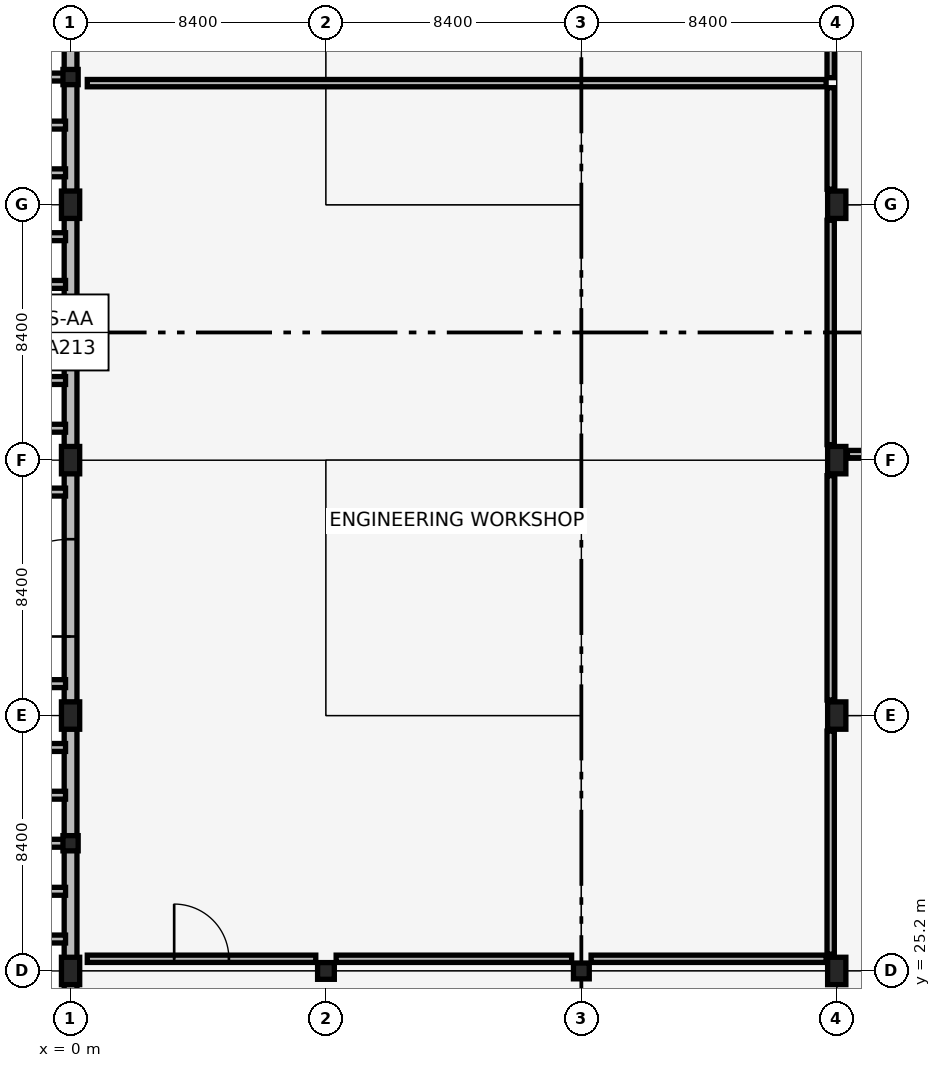
"""IFC4 building model, lengths in metres.
Left out: names, types, materials, properties, quantities, classifications, styles, units other than length and angle.
Written with IfcOpenShell. Run it as: python <this file> out.ifc"""

import sys

from ifc_helpers import new_model, si_unit, direction, frame, frame_2d, origin, origin_2d, place, context, subcontext, project, spatial, rectangle, extrude, element, fill, save


model = new_model("IFC4")
c1 = context("Model", 3, precision=1e-05, world=origin(), true_north=direction((0.0, 1.0)))
c2 = subcontext(c1, "Body", "Model", "MODEL_VIEW")
j1 = project(units=[si_unit("LENGTHUNIT", "METRE"), si_unit("PLANEANGLEUNIT", "RADIAN")], contexts=[c1])
p1 = place(None, origin())
s1 = spatial("IfcSite", under=j1, at=p1, CompositionType="ELEMENT")
p2 = place(p1, origin())
s2 = spatial("IfcBuilding", under=s1, at=p2, CompositionType="ELEMENT")
p3 = place(p2, origin())
s3 = spatial("IfcBuildingStorey", under=s2, at=p3, CompositionType="ELEMENT", Elevation=0.0)
p4 = place(p3, frame((0.0, 25.2, 0.0), z_axis=(0.0, 0.0, 1.0), x_axis=(1.0, 0.0, 0.0)))
e1 = element("IfcColumn", 1, at=p4, inside=s3, PredefinedType="COLUMN", context=c2, shape_type="SweptSolid", body=[
    extrude(rectangle(XDim=0.6, YDim=0.9, at=origin_2d()), origin(), (0.0, 0.0, 1.0), 5.14),
])
p5 = place(p3, frame((0.0, 29.4, 0.0), z_axis=(0.0, 0.0, 1.0), x_axis=(1.0, 0.0, 0.0)))
e2 = element("IfcColumn", 2, at=p5, inside=s3, PredefinedType="PILASTER", context=c2, shape_type="SweptSolid", body=[
    extrude(rectangle(XDim=0.5, YDim=0.5, at=origin_2d()), origin(), (0.0, 0.0, 1.0), 5.14),
])
for number, where, z_axis, x_axis in (
    (3, (0.0, 33.6, 0.0), (0.0, 0.0, 1.0), (1.0, 0.0, 0.0)),
    (4, (0.0, 42.0, 0.0), (0.0, 0.0, 1.0), (1.0, 0.0, 0.0)),
):
    element("IfcColumn", number, at=place(p3, frame(where, z_axis=z_axis, x_axis=x_axis)), inside=s3, PredefinedType="COLUMN", context=c2, shape_type="SweptSolid", body=[
        extrude(rectangle(XDim=0.6, YDim=0.9, at=origin_2d()), origin(), (0.0, 0.0, 1.0), 5.14),
    ])
p6 = place(p3, frame((0.0, 46.2, 0.0), z_axis=(0.0, 0.0, 1.0), x_axis=(1.0, 0.0, 0.0)))
e5 = element("IfcColumn", 5, at=p6, inside=s3, PredefinedType="PILASTER", context=c2, shape_type="SweptSolid", body=[
    extrude(rectangle(XDim=0.5, YDim=0.5, at=origin_2d()), origin(), (0.0, 0.0, 1.0), 5.14),
])
p7 = place(p3, frame((0.0, 50.4, 0.0), z_axis=(0.0, 0.0, 1.0), x_axis=(1.0, 0.0, 0.0)))
e6 = element("IfcColumn", 6, at=p7, inside=s3, PredefinedType="COLUMN", context=c2, shape_type="SweptSolid", body=[
    extrude(rectangle(XDim=0.6, YDim=0.9, at=origin_2d()), origin(), (0.0, 0.0, 1.0), 5.14),
])
p8 = place(p3, frame((0.0, 54.6, 0.0), z_axis=(0.0, 0.0, 1.0), x_axis=(1.0, 0.0, 0.0)))
e7 = element("IfcColumn", 7, at=p8, inside=s3, PredefinedType="PILASTER", context=c2, shape_type="SweptSolid", body=[
    extrude(rectangle(XDim=0.5, YDim=0.5, at=origin_2d()), origin(), (0.0, 0.0, 1.0), 5.14),
])
p9 = place(p3, frame((8.4, 25.2, 0.0), z_axis=(0.0, 0.0, 1.0), x_axis=(1.0, 0.0, 0.0)))
e8 = element("IfcColumn", 8, at=p9, inside=s3, PredefinedType="COLUMN", context=c2, shape_type="SweptSolid", body=[
    extrude(rectangle(XDim=0.55, YDim=0.55, at=origin_2d()), origin(), (0.0, 0.0, 1.0), 5.16),
])
p10 = place(p3, frame((16.8, 25.2, 0.0), z_axis=(0.0, 0.0, 1.0), x_axis=(1.0, 0.0, 0.0)))
e9 = element("IfcColumn", 9, at=p10, inside=s3, PredefinedType="COLUMN", context=c2, shape_type="SweptSolid", body=[
    extrude(rectangle(XDim=0.52, YDim=0.52, at=origin_2d()), origin(), (0.0, 0.0, 1.0), 5.16),
])
for number, where, z_axis, x_axis in (
    (10, (25.2, 25.2, 0.0), (0.0, 0.0, 1.0), (1.0, 0.0, 0.0)),
    (11, (25.2, 33.6, 0.0), (0.0, 0.0, 1.0), (1.0, 0.0, 0.0)),
    (12, (25.2, 42.0, 0.0), (0.0, 0.0, 1.0), (1.0, 0.0, 0.0)),
    (13, (25.2, 50.4, 0.0), (0.0, 0.0, 1.0), (1.0, 0.0, 0.0)),
):
    element("IfcColumn", number, at=place(p3, frame(where, z_axis=z_axis, x_axis=x_axis)), inside=s3, PredefinedType="COLUMN", context=c2, shape_type="SweptSolid", body=[
        extrude(rectangle(XDim=0.6, YDim=0.9, at=origin_2d()), origin(), (0.0, 0.0, 1.0), 5.14),
    ])
p11 = place(p3, frame((0.0, 17.025, 0.0), z_axis=(0.0, 0.0, 1.0), x_axis=(0.0, 1.0, 0.0)))
e14 = element("IfcWall", 14, at=p11, inside=s3, PredefinedType="SOLIDWALL", context=c2, shape_type="SweptSolid", body=[
    extrude(rectangle(XDim=7.74, YDim=0.42, at=frame_2d((3.87, 0.0))), origin(), (0.0, 0.0, 1.0), 4.39),
])
p12 = place(p3, frame((0.0, 25.635, 0.0), z_axis=(0.0, 0.0, 1.0), x_axis=(0.0, 1.0, 0.0)))
e15 = element("IfcWall", 15, at=p12, inside=s3, PredefinedType="SOLIDWALL", context=c2, shape_type="SweptSolid", body=[
    extrude(rectangle(XDim=7.53, YDim=0.42, at=frame_2d((3.765, 0.0))), origin(), (0.0, 0.0, 1.0), 5.04),
])
for number, where, z_axis, x_axis in (
    (16, (-0.165, 26.25, -0.25), (0.0, 0.0, 1.0), (-1.0, 0.0, 0.0)),
    (17, (-0.165, 27.82, -0.25), (0.0, 0.0, 1.0), (-1.0, 0.0, 0.0)),
    (18, (-0.165, 29.4, -0.25), (0.0, 0.0, 1.0), (-1.0, 0.0, 0.0)),
    (19, (-0.165, 30.98, -0.25), (0.0, 0.0, 1.0), (-1.0, 0.0, 0.0)),
    (20, (-0.165, 32.55, -0.25), (0.0, 0.0, 1.0), (-1.0, 0.0, 0.0)),
):
    element("IfcWall", number, at=place(p3, frame(where, z_axis=z_axis, x_axis=x_axis)), inside=s3, PredefinedType="SOLIDWALL", context=c2, shape_type="SweptSolid", body=[
        extrude(rectangle(XDim=0.7, YDim=0.26, at=frame_2d((0.35, 0.0))), origin(), (0.0, 0.0, 1.0), 5.69),
    ])
p13 = place(p3, frame((0.0, 34.035, 0.0), z_axis=(0.0, 0.0, 1.0), x_axis=(0.0, 1.0, 0.0)))
e21 = element("IfcWall", 21, at=p13, inside=s3, PredefinedType="SOLIDWALL", context=c2, shape_type="SweptSolid", body=[
    extrude(rectangle(XDim=7.53, YDim=0.42, at=frame_2d((3.765, 0.0))), origin(), (0.0, 0.0, 1.0), 5.04),
])
p14 = place(p13, frame((2.165, 0.0, 0.0)))
e22 = element("IfcOpeningElement", 22, at=p14, cuts=e21, PredefinedType="OPENING", context=c2, shape_type="SweptSolid", body=[
    extrude(rectangle(XDim=3.2, YDim=3.6, at=frame_2d((1.6, 1.8))), frame((0.0, 0.22, 0.0), z_axis=(0.0, -1.0, 0.0), x_axis=(1.0, 0.0, 0.0)), (0.0, 0.0, 1.0), 0.44),
])
for number, where, z_axis, x_axis in (
    (23, (-0.165, 34.65, -0.25), (0.0, 0.0, 1.0), (-1.0, 0.0, 0.0)),
    (24, (-0.165, 40.95, -0.25), (0.0, 0.0, 1.0), (-1.0, 0.0, 0.0)),
):
    element("IfcWall", number, at=place(p3, frame(where, z_axis=z_axis, x_axis=x_axis)), inside=s3, PredefinedType="SOLIDWALL", context=c2, shape_type="SweptSolid", body=[
        extrude(rectangle(XDim=0.7, YDim=0.26, at=frame_2d((0.35, 0.0))), origin(), (0.0, 0.0, 1.0), 5.69),
    ])
p15 = place(p3, frame((0.0, 42.435, 0.0), z_axis=(0.0, 0.0, 1.0), x_axis=(0.0, 1.0, 0.0)))
e25 = element("IfcWall", 25, at=p15, inside=s3, PredefinedType="SOLIDWALL", context=c2, shape_type="SweptSolid", body=[
    extrude(rectangle(XDim=7.53, YDim=0.42, at=frame_2d((3.765, 0.0))), origin(), (0.0, 0.0, 1.0), 5.04),
])
for number, where, z_axis, x_axis in (
    (26, (-0.165, 43.05, -0.25), (0.0, 0.0, 1.0), (-1.0, 0.0, 0.0)),
    (27, (-0.165, 44.62, -0.25), (0.0, 0.0, 1.0), (-1.0, 0.0, 0.0)),
    (28, (-0.165, 46.2, -0.25), (0.0, 0.0, 1.0), (-1.0, 0.0, 0.0)),
    (29, (-0.165, 47.78, -0.25), (0.0, 0.0, 1.0), (-1.0, 0.0, 0.0)),
    (30, (-0.165, 49.35, -0.25), (0.0, 0.0, 1.0), (-1.0, 0.0, 0.0)),
):
    element("IfcWall", number, at=place(p3, frame(where, z_axis=z_axis, x_axis=x_axis)), inside=s3, PredefinedType="SOLIDWALL", context=c2, shape_type="SweptSolid", body=[
        extrude(rectangle(XDim=0.7, YDim=0.26, at=frame_2d((0.35, 0.0))), origin(), (0.0, 0.0, 1.0), 5.69),
    ])
p16 = place(p3, frame((0.0, 50.835, 0.0), z_axis=(0.0, 0.0, 1.0), x_axis=(0.0, 1.0, 0.0)))
e31 = element("IfcWall", 31, at=p16, inside=s3, PredefinedType="SOLIDWALL", context=c2, shape_type="SweptSolid", body=[
    extrude(rectangle(XDim=7.53, YDim=0.42, at=frame_2d((3.765, 0.0))), origin(), (0.0, 0.0, 1.0), 5.04),
])
for number, where, z_axis, x_axis in (
    (32, (-0.165, 51.45, -0.25), (0.0, 0.0, 1.0), (-1.0, 0.0, 0.0)),
    (33, (-0.165, 53.02, -0.25), (0.0, 0.0, 1.0), (-1.0, 0.0, 0.0)),
    (34, (-0.165, 54.6, -0.25), (0.0, 0.0, 1.0), (-1.0, 0.0, 0.0)),
):
    element("IfcWall", number, at=place(p3, frame(where, z_axis=z_axis, x_axis=x_axis)), inside=s3, PredefinedType="SOLIDWALL", context=c2, shape_type="SweptSolid", body=[
        extrude(rectangle(XDim=0.7, YDim=0.26, at=frame_2d((0.35, 0.0))), origin(), (0.0, 0.0, 1.0), 5.69),
    ])
p17 = place(p3, frame((0.55, 25.6, 0.0), z_axis=(0.0, 0.0, 1.0), x_axis=(1.0, 0.0, 0.0)))
e35 = element("IfcWall", 35, at=p17, inside=s3, PredefinedType="PARTITIONING", context=c2, shape_type="SweptSolid", body=[
    extrude(rectangle(XDim=7.515, YDim=0.24, at=frame_2d((3.757, 0.0))), origin(), (0.0, 0.0, 1.0), 5.14),
])
p18 = place(p17, frame((2.857, 0.0, 0.0)))
e36 = element("IfcOpeningElement", 36, at=p18, cuts=e35, PredefinedType="OPENING", context=c2, shape_type="SweptSolid", body=[
    extrude(rectangle(XDim=1.8, YDim=2.4, at=frame_2d((0.9, 1.2))), frame((0.0, 0.13, 0.0), z_axis=(0.0, -1.0, 0.0), x_axis=(1.0, 0.0, 0.0)), (0.0, 0.0, 1.0), 0.26),
])
p19 = place(p3, frame((8.735, 25.6, 0.0), z_axis=(0.0, 0.0, 1.0), x_axis=(1.0, 0.0, 0.0)))
e37 = element("IfcWall", 37, at=p19, inside=s3, PredefinedType="PARTITIONING", context=c2, shape_type="SweptSolid", body=[
    extrude(rectangle(XDim=7.745, YDim=0.24, at=frame_2d((3.873, 0.0))), origin(), (0.0, 0.0, 1.0), 5.14),
])
p20 = place(p3, frame((17.12, 25.6, 0.0), z_axis=(0.0, 0.0, 1.0), x_axis=(1.0, 0.0, 0.0)))
e38 = element("IfcWall", 38, at=p20, inside=s3, PredefinedType="PARTITIONING", context=c2, shape_type="SweptSolid", body=[
    extrude(rectangle(XDim=7.73, YDim=0.24, at=frame_2d((3.865, 0.0))), origin(), (0.0, 0.0, 1.0), 5.14),
])
p21 = place(p3, frame((0.55, 54.4, 0.0), z_axis=(0.0, 0.0, 1.0), x_axis=(1.0, 0.0, 0.0)))
e39 = element("IfcWall", 39, at=p21, inside=s3, PredefinedType="PARTITIONING", context=c2, shape_type="SweptSolid", body=[
    extrude(rectangle(XDim=24.3, YDim=0.24, at=frame_2d((12.15, 0.0))), origin(), (0.0, 0.0, 1.0), 5.14),
])
p22 = place(p3, frame((25.0, 25.75, 0.0), z_axis=(0.0, 0.0, 1.0), x_axis=(0.0, 1.0, 0.0)))
e40 = element("IfcWall", 40, at=p22, inside=s3, PredefinedType="PARTITIONING", context=c2, shape_type="SweptSolid", body=[
    extrude(rectangle(XDim=7.34, YDim=0.24, at=frame_2d((3.67, 0.0))), origin(), (0.0, 0.0, 1.0), 4.35),
])
for number, where, z_axis, x_axis in (
    (41, (25.0, 34.11, 0.0), (0.0, 0.0, 1.0), (0.0, 1.0, 0.0)),
    (42, (25.0, 42.51, 0.0), (0.0, 0.0, 1.0), (0.0, 1.0, 0.0)),
):
    element("IfcWall", number, at=place(p3, frame(where, z_axis=z_axis, x_axis=x_axis)), inside=s3, PredefinedType="PARTITIONING", context=c2, shape_type="SweptSolid", body=[
        extrude(rectangle(XDim=7.38, YDim=0.24, at=frame_2d((3.69, 0.0))), origin(), (0.0, 0.0, 1.0), 4.35),
    ])
p23 = place(p3, frame((25.0, 50.91, 0.0), z_axis=(0.0, 0.0, 1.0), x_axis=(0.0, 1.0, 0.0)))
e43 = element("IfcWall", 43, at=p23, inside=s3, PredefinedType="PARTITIONING", context=c2, shape_type="SweptSolid", body=[
    extrude(rectangle(XDim=3.34, YDim=0.24, at=frame_2d((1.67, 0.0))), origin(), (0.0, 0.0, 1.0), 4.35),
])
p24 = place(p3, frame((25.0, 54.58, 0.0), z_axis=(0.0, 0.0, 1.0), x_axis=(0.0, 1.0, 0.0)))
e44 = element("IfcWall", 44, at=p24, inside=s3, PredefinedType="PARTITIONING", context=c2, shape_type="SweptSolid", body=[
    extrude(rectangle(XDim=3.71, YDim=0.24, at=frame_2d((1.855, 0.0))), origin(), (0.0, 0.0, 1.0), 4.35),
])
p25 = place(p24, frame((0.955, 0.0, 0.0)))
e45 = element("IfcOpeningElement", 45, at=p25, cuts=e44, PredefinedType="OPENING", context=c2, shape_type="SweptSolid", body=[
    extrude(rectangle(XDim=1.8, YDim=2.4, at=frame_2d((0.9, 1.2))), frame((0.0, 0.13, 0.0), z_axis=(0.0, -1.0, 0.0), x_axis=(1.0, 0.0, 0.0)), (0.0, 0.0, 1.0), 0.26),
])
p26 = place(p3, frame((25.55, 42.2, 0.0), z_axis=(0.0, 0.0, 1.0), x_axis=(1.0, 0.0, 0.0)))
e46 = element("IfcWall", 46, at=p26, inside=s3, PredefinedType="PARTITIONING", context=c2, shape_type="SweptSolid", body=[
    extrude(rectangle(XDim=7.5, YDim=0.24, at=frame_2d((3.75, 0.0))), origin(), (0.0, 0.0, 1.0), 4.42),
])
p27 = place(p14, origin())
e47 = element("IfcDoor", 47, at=p27, inside=s3, OperationType="DOUBLE_DOOR_SINGLE_SWING", PredefinedType="GATE", context=c2, shape_type="SweptSolid", body=[
    extrude(rectangle(XDim=3.2, YDim=3.6, at=frame_2d((1.6, 1.8))), frame((0.0, 0.025, 0.0), z_axis=(0.0, -1.0, 0.0), x_axis=(1.0, 0.0, 0.0)), (0.0, 0.0, 1.0), 0.05),
])
fill(e22, e47)
p28 = place(p18, origin())
e48 = element("IfcDoor", 48, at=p28, inside=s3, OperationType="DOUBLE_DOOR_SINGLE_SWING", PredefinedType="DOOR", context=c2, shape_type="SweptSolid", body=[
    extrude(rectangle(XDim=1.8, YDim=2.4, at=frame_2d((0.9, 1.2))), frame((0.0, 0.025, 0.0), z_axis=(0.0, -1.0, 0.0), x_axis=(1.0, 0.0, 0.0)), (0.0, 0.0, 1.0), 0.05),
])
fill(e36, e48)
save(model, sys.argv[1])
